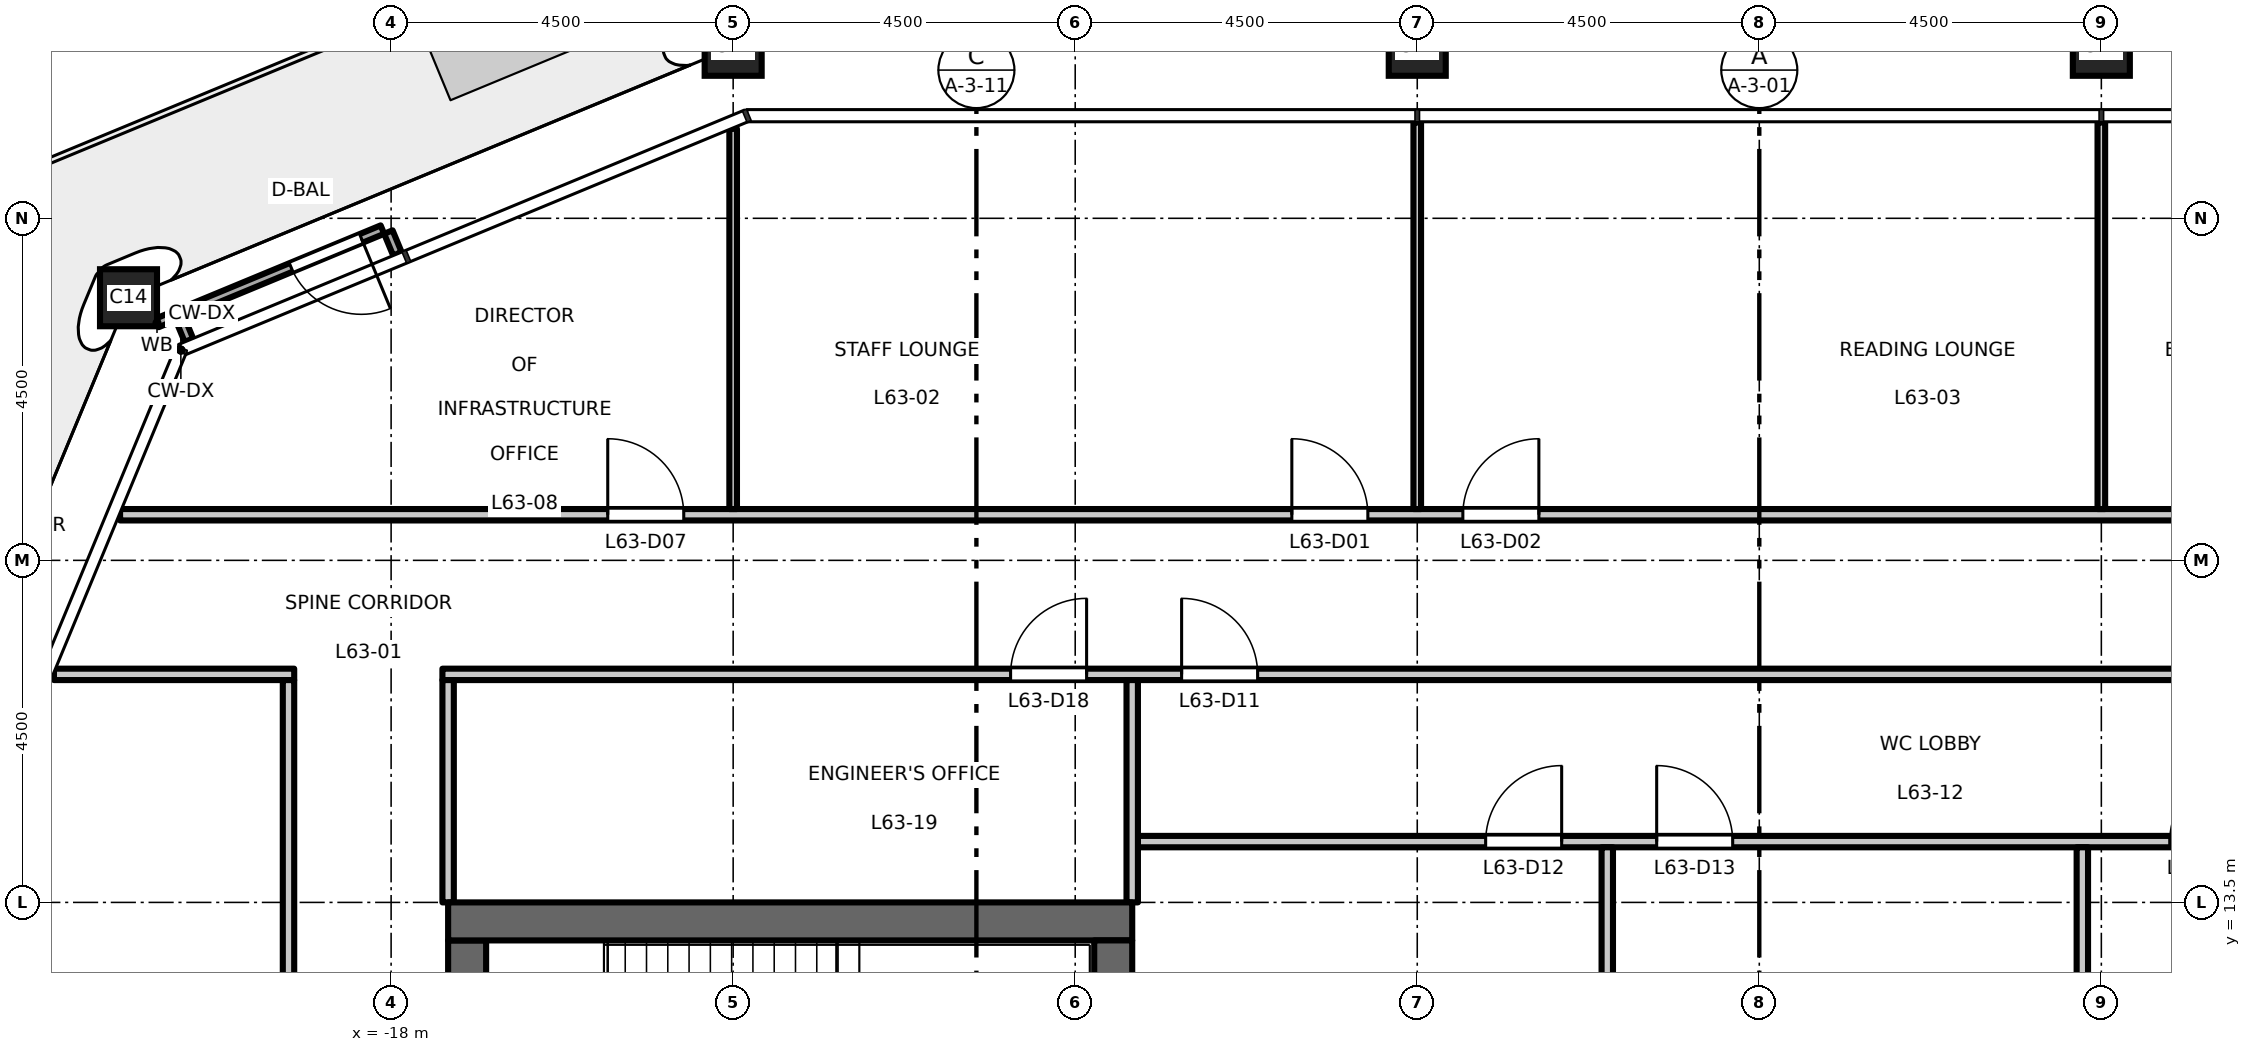
"""IFC4 building model, lengths in metres.
Left out: names, types, materials, properties, quantities, classifications, styles, units other than length and angle.
Written with IfcOpenShell. Run it as: python <this file> out.ifc"""

import sys

from ifc_helpers import new_model, si_unit, direction, frame, frame_2d, origin, origin_2d, place, context, subcontext, project, spatial, rectangle, hollow_rectangle, extrude, element, fill, save


model = new_model("IFC4")
c1 = context("Model", 3, precision=1e-05, world=origin(), true_north=direction((0.0, 1.0)))
c2 = subcontext(c1, "Body", "Model", "MODEL_VIEW")
j1 = project(units=[si_unit("LENGTHUNIT", "METRE"), si_unit("PLANEANGLEUNIT", "RADIAN")], contexts=[c1])
p1 = place(None, origin())
s1 = spatial("IfcSite", under=j1, at=p1, CompositionType="ELEMENT")
p2 = place(p1, origin())
s2 = spatial("IfcBuilding", under=s1, at=p2, CompositionType="ELEMENT")
p3 = place(p2, frame((0.0, 0.0, 294.2)))
s3 = spatial("IfcBuildingStorey", under=s2, at=p3, CompositionType="ELEMENT", Elevation=294.2)
for number, where, z_axis, x_axis in (
    (1, (4.5, 24.75, 0.0), (0.0, 0.0, 1.0), (1.0, 0.0, 0.0)),
    (2, (-4.5, 24.75, 0.0), (0.0, 0.0, 1.0), (1.0, 0.0, 0.0)),
    (3, (-13.5, 24.75, 0.0), (0.0, 0.0, 1.0), (1.0, 0.0, 0.0)),
    (4, (-21.455, 21.455, 0.0), (0.0, 0.0, 1.0), (1.0, 0.0, 0.0)),
):
    element("IfcColumn", number, at=place(p3, frame(where, z_axis=z_axis, x_axis=x_axis)), inside=s3, PredefinedType="COLUMN", context=c2, shape_type="SweptSolid", body=[
        extrude(hollow_rectangle(XDim=0.75, YDim=0.75, WallThickness=0.04, at=origin_2d()), origin(), (0.0, 0.0, 1.0), 4.5),
    ])
p4 = place(p3, frame((-17.0, -13.0, 0.0), z_axis=(0.0, 0.0, 1.0), x_axis=(0.0, 1.0, 0.0)))
e5 = element("IfcWall", 5, at=p4, inside=s3, PredefinedType="SHEAR", context=c2, shape_type="SweptSolid", body=[
    extrude(rectangle(XDim=26.0, YDim=0.5, at=frame_2d((13.0, 0.0))), origin(), (0.0, 0.0, 1.0), 4.35),
])
p5 = place(p4, frame((16.825, 0.0, 0.0)))
e6 = element("IfcOpeningElement", 6, at=p5, cuts=e5, PredefinedType="OPENING", context=c2, shape_type="SweptSolid", body=[
    extrude(rectangle(XDim=1.8, YDim=2.1, at=frame_2d((0.9, 1.05))), frame((0.0, 0.26, 0.0), z_axis=(0.0, -1.0, 0.0), x_axis=(1.0, 0.0, 0.0)), (0.0, 0.0, 1.0), 0.52),
])
p6 = place(p4, frame((7.375, 0.0, 0.0)))
e7 = element("IfcOpeningElement", 7, at=p6, cuts=e5, PredefinedType="OPENING", context=c2, shape_type="SweptSolid", body=[
    extrude(rectangle(XDim=1.8, YDim=2.1, at=frame_2d((0.9, 1.05))), frame((0.0, 0.26, 0.0), z_axis=(0.0, -1.0, 0.0), x_axis=(1.0, 0.0, 0.0)), (0.0, 0.0, 1.0), 0.52),
])
p7 = place(p3, frame((-8.25, 13.25, 0.0), z_axis=(0.0, 0.0, 1.0), x_axis=(-1.0, 0.0, 0.0)))
e8 = element("IfcWall", 8, at=p7, inside=s3, PredefinedType="SHEAR", context=c2, shape_type="SweptSolid", body=[
    extrude(rectangle(XDim=9.0, YDim=0.5, at=frame_2d((4.5, 0.0))), origin(), (0.0, 0.0, 1.0), 4.35),
])
p8 = place(p3, frame((-8.5, -13.0, 0.0), z_axis=(0.0, 0.0, 1.0), x_axis=(0.0, 1.0, 0.0)))
e9 = element("IfcWall", 9, at=p8, inside=s3, PredefinedType="SHEAR", context=c2, shape_type="SweptSolid", body=[
    extrude(rectangle(XDim=26.0, YDim=0.5, at=frame_2d((13.0, 0.0))), origin(), (0.0, 0.0, 1.0), 4.35),
])
p9 = place(p3, frame((-17.917, 22.033, 0.0), z_axis=(0.0, 0.0, 1.0), x_axis=(-0.382769136873, 0.923844027884, 0.0)))
e10 = element("IfcWall", 10, at=p9, inside=s3, PredefinedType="STANDARD", context=c2, shape_type="SweptSolid", body=[
    extrude(rectangle(XDim=0.31, YDim=0.12, at=frame_2d((0.155, 0.0))), origin(), (0.0, 0.0, 1.0), 4.35),
])
p10 = place(p3, frame((-20.66, 20.896, 0.0), z_axis=(0.0, 0.0, 1.0), x_axis=(-0.382490814953, 0.923959293734, 0.0)))
e11 = element("IfcWall", 11, at=p10, inside=s3, PredefinedType="STANDARD", context=c2, shape_type="SweptSolid", body=[
    extrude(rectangle(XDim=0.31, YDim=0.12, at=frame_2d((0.155, 0.0))), origin(), (0.0, 0.0, 1.0), 4.35),
])
p11 = place(p3, frame((-18.115, 22.352, 0.0), z_axis=(0.0, 0.0, 1.0), x_axis=(-0.923880552517, -0.382680969843, 0.0)))
e12 = element("IfcWall", 12, at=p11, inside=s3, PredefinedType="STANDARD", context=c2, shape_type="SweptSolid", body=[
    extrude(rectangle(XDim=3.21, YDim=0.12, at=frame_2d((1.605, 0.0))), origin(), (0.0, 0.0, 1.0), 4.35),
])
p12 = place(p11, frame((0.3, 0.0, 0.0)))
e13 = element("IfcOpeningElement", 13, at=p12, cuts=e12, PredefinedType="OPENING", context=c2, shape_type="SweptSolid", body=[
    extrude(rectangle(XDim=1.0, YDim=2.4, at=frame_2d((0.5, 1.2))), frame((0.0, 0.07, 0.0), z_axis=(0.0, -1.0, 0.0), x_axis=(1.0, 0.0, 0.0)), (0.0, 0.0, 1.0), 0.14),
])
p13 = place(p3, frame((-8.175, 14.3, 0.0), z_axis=(0.0, 0.0, 1.0), x_axis=(1.0, 0.0, 0.0)))
e14 = element("IfcWall", 14, at=p13, inside=s3, PredefinedType="PARTITIONING", context=c2, shape_type="SweptSolid", body=[
    extrude(rectangle(XDim=15.095, YDim=0.15, at=frame_2d((7.547, 0.0))), origin(), (0.0, 0.0, 1.0), 4.35),
])
p14 = place(p13, frame((4.575, 0.0, 0.0)))
e15 = element("IfcOpeningElement", 15, at=p14, cuts=e14, PredefinedType="OPENING", context=c2, shape_type="SweptSolid", body=[
    extrude(rectangle(XDim=1.0, YDim=2.1, at=frame_2d((0.5, 1.05))), frame((0.0, 0.085, 0.0), z_axis=(0.0, -1.0, 0.0), x_axis=(1.0, 0.0, 0.0)), (0.0, 0.0, 1.0), 0.17),
])
p15 = place(p13, frame((6.825, 0.0, 0.0)))
e16 = element("IfcOpeningElement", 16, at=p15, cuts=e14, PredefinedType="OPENING", context=c2, shape_type="SweptSolid", body=[
    extrude(rectangle(XDim=1.0, YDim=2.1, at=frame_2d((0.5, 1.05))), frame((0.0, 0.085, 0.0), z_axis=(0.0, -1.0, 0.0), x_axis=(1.0, 0.0, 0.0)), (0.0, 0.0, 1.0), 0.17),
])
p16 = place(p13, frame((13.575, 0.0, 0.0)))
e17 = element("IfcOpeningElement", 17, at=p16, cuts=e14, PredefinedType="OPENING", context=c2, shape_type="SweptSolid", body=[
    extrude(rectangle(XDim=1.0, YDim=2.1, at=frame_2d((0.5, 1.05))), frame((0.0, 0.085, 0.0), z_axis=(0.0, -1.0, 0.0), x_axis=(1.0, 0.0, 0.0)), (0.0, 0.0, 1.0), 0.17),
])
p17 = place(p3, frame((-22.436, 16.5, 0.0), z_axis=(0.0, 0.0, 1.0), x_axis=(1.0, 0.0, 0.0)))
e18 = element("IfcWall", 18, at=p17, inside=s3, PredefinedType="PARTITIONING", context=c2, shape_type="SweptSolid", body=[
    extrude(rectangle(XDim=3.161, YDim=0.15, at=frame_2d((1.581, 0.0))), origin(), (0.0, 0.0, 1.0), 4.35),
])
p18 = place(p3, frame((-17.325, 16.5, 0.0), z_axis=(0.0, 0.0, 1.0), x_axis=(1.0, 0.0, 0.0)))
e19 = element("IfcWall", 19, at=p18, inside=s3, PredefinedType="PARTITIONING", context=c2, shape_type="SweptSolid", body=[
    extrude(rectangle(XDim=34.65, YDim=0.15, at=frame_2d((17.325, 0.0))), origin(), (0.0, 0.0, 1.0), 4.35),
])
p19 = place(p18, frame((9.725, 0.0, 0.0)))
e20 = element("IfcOpeningElement", 20, at=p19, cuts=e19, PredefinedType="OPENING", context=c2, shape_type="SweptSolid", body=[
    extrude(rectangle(XDim=1.0, YDim=2.1, at=frame_2d((0.5, 1.05))), frame((0.0, 0.085, 0.0), z_axis=(0.0, -1.0, 0.0), x_axis=(1.0, 0.0, 0.0)), (0.0, 0.0, 1.0), 0.17),
])
p20 = place(p18, frame((7.475, 0.0, 0.0)))
e21 = element("IfcOpeningElement", 21, at=p20, cuts=e19, PredefinedType="OPENING", context=c2, shape_type="SweptSolid", body=[
    extrude(rectangle(XDim=1.0, YDim=2.1, at=frame_2d((0.5, 1.05))), frame((0.0, 0.085, 0.0), z_axis=(0.0, -1.0, 0.0), x_axis=(1.0, 0.0, 0.0)), (0.0, 0.0, 1.0), 0.17),
])
p21 = place(p18, frame((26.225, 0.0, 0.0)))
e22 = element("IfcOpeningElement", 22, at=p21, cuts=e19, PredefinedType="OPENING", context=c2, shape_type="SweptSolid", body=[
    extrude(rectangle(XDim=1.0, YDim=2.1, at=frame_2d((0.5, 1.05))), frame((0.0, 0.085, 0.0), z_axis=(0.0, -1.0, 0.0), x_axis=(1.0, 0.0, 0.0)), (0.0, 0.0, 1.0), 0.17),
])
p22 = place(p3, frame((-21.566, 18.6, 0.0), z_axis=(0.0, 0.0, 1.0), x_axis=(1.0, 0.0, 0.0)))
e23 = element("IfcWall", 23, at=p22, inside=s3, PredefinedType="PARTITIONING", context=c2, shape_type="SweptSolid", body=[
    extrude(rectangle(XDim=43.132, YDim=0.15, at=frame_2d((21.566, 0.0))), origin(), (0.0, 0.0, 1.0), 4.35),
])
p23 = place(p22, frame((15.416, 0.0, 0.0)))
e24 = element("IfcOpeningElement", 24, at=p23, cuts=e23, PredefinedType="OPENING", context=c2, shape_type="SweptSolid", body=[
    extrude(rectangle(XDim=1.0, YDim=2.1, at=frame_2d((0.5, 1.05))), frame((0.0, 0.085, 0.0), z_axis=(0.0, -1.0, 0.0), x_axis=(1.0, 0.0, 0.0)), (0.0, 0.0, 1.0), 0.17),
])
p24 = place(p22, frame((17.666, 0.0, 0.0)))
e25 = element("IfcOpeningElement", 25, at=p24, cuts=e23, PredefinedType="OPENING", context=c2, shape_type="SweptSolid", body=[
    extrude(rectangle(XDim=1.0, YDim=2.1, at=frame_2d((0.5, 1.05))), frame((0.0, 0.085, 0.0), z_axis=(0.0, -1.0, 0.0), x_axis=(1.0, 0.0, 0.0)), (0.0, 0.0, 1.0), 0.17),
])
p25 = place(p22, frame((33.416, 0.0, 0.0)))
e26 = element("IfcOpeningElement", 26, at=p25, cuts=e23, PredefinedType="OPENING", context=c2, shape_type="SweptSolid", body=[
    extrude(rectangle(XDim=1.0, YDim=2.1, at=frame_2d((0.5, 1.05))), frame((0.0, 0.085, 0.0), z_axis=(0.0, -1.0, 0.0), x_axis=(1.0, 0.0, 0.0)), (0.0, 0.0, 1.0), 0.17),
])
p26 = place(p22, frame((6.416, 0.0, 0.0)))
e27 = element("IfcOpeningElement", 27, at=p26, cuts=e23, PredefinedType="OPENING", context=c2, shape_type="SweptSolid", body=[
    extrude(rectangle(XDim=1.0, YDim=2.1, at=frame_2d((0.5, 1.05))), frame((0.0, 0.085, 0.0), z_axis=(0.0, -1.0, 0.0), x_axis=(1.0, 0.0, 0.0)), (0.0, 0.0, 1.0), 0.17),
])
p27 = place(p22, frame((35.732, 0.0, 0.0)))
e28 = element("IfcOpeningElement", 28, at=p27, cuts=e23, PredefinedType="OPENING", context=c2, shape_type="SweptSolid", body=[
    extrude(rectangle(XDim=1.0, YDim=2.1, at=frame_2d((0.5, 1.05))), frame((0.0, 0.085, 0.0), z_axis=(0.0, -1.0, 0.0), x_axis=(1.0, 0.0, 0.0)), (0.0, 0.0, 1.0), 0.17),
])
p28 = place(p3, frame((-19.35, -16.425, 0.0), z_axis=(0.0, 0.0, 1.0), x_axis=(0.0, 1.0, 0.0)))
e29 = element("IfcWall", 29, at=p28, inside=s3, PredefinedType="PARTITIONING", context=c2, shape_type="SweptSolid", body=[
    extrude(rectangle(XDim=32.85, YDim=0.15, at=frame_2d((16.425, 0.0))), origin(), (0.0, 0.0, 1.0), 4.35),
])
p29 = place(p28, frame((0.525, 0.0, 0.0)))
e30 = element("IfcOpeningElement", 30, at=p29, cuts=e29, PredefinedType="OPENING", context=c2, shape_type="SweptSolid", body=[
    extrude(rectangle(XDim=1.0, YDim=2.1, at=frame_2d((0.5, 1.05))), frame((0.0, 0.085, 0.0), z_axis=(0.0, -1.0, 0.0), x_axis=(1.0, 0.0, 0.0)), (0.0, 0.0, 1.0), 0.17),
])
p30 = place(p3, frame((-17.25, 13.5, 0.0), z_axis=(0.0, 0.0, 1.0), x_axis=(0.0, 1.0, 0.0)))
e31 = element("IfcWall", 31, at=p30, inside=s3, PredefinedType="PARTITIONING", context=c2, shape_type="SweptSolid", body=[
    extrude(rectangle(XDim=2.925, YDim=0.15, at=frame_2d((1.462, 0.0))), origin(), (0.0, 0.0, 1.0), 4.35),
])
p31 = place(p3, frame((-13.5, 18.675, 0.0), z_axis=(0.0, 0.0, 1.0), x_axis=(0.0, 1.0, 0.0)))
e32 = element("IfcWall", 32, at=p31, inside=s3, PredefinedType="PARTITIONING", context=c2, shape_type="SweptSolid", body=[
    extrude(rectangle(XDim=5.003, YDim=0.1, at=frame_2d((2.501, 0.0))), origin(), (0.0, 0.0, 1.0), 3.75),
])
p32 = place(p3, frame((-8.25, 13.5, 0.0), z_axis=(0.0, 0.0, 1.0), x_axis=(0.0, 1.0, 0.0)))
e33 = element("IfcWall", 33, at=p32, inside=s3, PredefinedType="PARTITIONING", context=c2, shape_type="SweptSolid", body=[
    extrude(rectangle(XDim=2.925, YDim=0.15, at=frame_2d((1.462, 0.0))), origin(), (0.0, 0.0, 1.0), 4.35),
])
p33 = place(p3, frame((-4.5, 18.675, 0.0), z_axis=(0.0, 0.0, 1.0), x_axis=(0.0, 1.0, 0.0)))
e34 = element("IfcWall", 34, at=p33, inside=s3, PredefinedType="PARTITIONING", context=c2, shape_type="SweptSolid", body=[
    extrude(rectangle(XDim=5.085, YDim=0.1, at=frame_2d((2.542, 0.0))), origin(), (0.0, 0.0, 1.0), 3.65),
])
for number, where, z_axis, x_axis in (
    (35, (-2.0, 8.37, 0.0), (0.0, 0.0, 1.0), (0.0, 1.0, 0.0)),
    (36, (4.25, 8.37, 0.0), (0.0, 0.0, 1.0), (0.0, 1.0, 0.0)),
):
    element("IfcWall", number, at=place(p3, frame(where, z_axis=z_axis, x_axis=x_axis)), inside=s3, PredefinedType="PARTITIONING", context=c2, shape_type="SweptSolid", body=[
        extrude(rectangle(XDim=5.855, YDim=0.15, at=frame_2d((2.927, 0.0))), origin(), (0.0, 0.0, 1.0), 4.35),
    ])
p34 = place(p3, frame((4.5, 18.675, 0.0), z_axis=(0.0, 0.0, 1.0), x_axis=(0.0, 1.0, 0.0)))
e37 = element("IfcWall", 37, at=p34, inside=s3, PredefinedType="PARTITIONING", context=c2, shape_type="SweptSolid", body=[
    extrude(rectangle(XDim=5.085, YDim=0.1, at=frame_2d((2.542, 0.0))), origin(), (0.0, 0.0, 1.0), 3.65),
])
p35 = place(p12, origin())
e38 = element("IfcDoor", 38, at=p35, inside=s3, OperationType="SINGLE_SWING_LEFT", PredefinedType="DOOR", context=c2, shape_type="SweptSolid", body=[
    extrude(rectangle(XDim=1.0, YDim=2.4, at=frame_2d((0.5, 1.2))), frame((0.0, 0.025, 0.0), z_axis=(0.0, -1.0, 0.0), x_axis=(1.0, 0.0, 0.0)), (0.0, 0.0, 1.0), 0.05),
])
fill(e13, e38)
p36 = place(p23, origin())
e39 = element("IfcDoor", 39, at=p36, inside=s3, OperationType="SINGLE_SWING_LEFT", PredefinedType="DOOR", context=c2, shape_type="SweptSolid", body=[
    extrude(rectangle(XDim=1.0, YDim=2.1, at=frame_2d((0.5, 1.05))), frame((0.0, 0.025, 0.0), z_axis=(0.0, -1.0, 0.0), x_axis=(1.0, 0.0, 0.0)), (0.0, 0.0, 1.0), 0.05),
])
fill(e24, e39)
p37 = place(p24, origin())
e40 = element("IfcDoor", 40, at=p37, inside=s3, OperationType="SINGLE_SWING_RIGHT", PredefinedType="DOOR", context=c2, shape_type="SweptSolid", body=[
    extrude(rectangle(XDim=1.0, YDim=2.1, at=frame_2d((0.5, 1.05))), frame((0.0, 0.025, 0.0), z_axis=(0.0, -1.0, 0.0), x_axis=(1.0, 0.0, 0.0)), (0.0, 0.0, 1.0), 0.05),
])
fill(e25, e40)
p38 = place(p26, origin())
e41 = element("IfcDoor", 41, at=p38, inside=s3, OperationType="SINGLE_SWING_LEFT", PredefinedType="DOOR", context=c2, shape_type="SweptSolid", body=[
    extrude(rectangle(XDim=1.0, YDim=2.1, at=frame_2d((0.5, 1.05))), frame((0.0, 0.025, 0.0), z_axis=(0.0, -1.0, 0.0), x_axis=(1.0, 0.0, 0.0)), (0.0, 0.0, 1.0), 0.05),
])
fill(e27, e41)
p39 = place(p19, origin())
e42 = element("IfcDoor", 42, at=p39, inside=s3, OperationType="SINGLE_SWING_LEFT", PredefinedType="DOOR", context=c2, shape_type="SweptSolid", body=[
    extrude(rectangle(XDim=1.0, YDim=2.1, at=frame_2d((0.5, 1.05))), frame((0.0, 0.025, 0.0), z_axis=(0.0, -1.0, 0.0), x_axis=(1.0, 0.0, 0.0)), (0.0, 0.0, 1.0), 0.05),
])
fill(e20, e42)
p40 = place(p14, origin())
e43 = element("IfcDoor", 43, at=p40, inside=s3, OperationType="SINGLE_SWING_RIGHT", PredefinedType="DOOR", context=c2, shape_type="SweptSolid", body=[
    extrude(rectangle(XDim=1.0, YDim=2.1, at=frame_2d((0.5, 1.05))), frame((0.0, 0.025, 0.0), z_axis=(0.0, -1.0, 0.0), x_axis=(1.0, 0.0, 0.0)), (0.0, 0.0, 1.0), 0.05),
])
fill(e15, e43)
p41 = place(p15, origin())
e44 = element("IfcDoor", 44, at=p41, inside=s3, OperationType="SINGLE_SWING_LEFT", PredefinedType="DOOR", context=c2, shape_type="SweptSolid", body=[
    extrude(rectangle(XDim=1.0, YDim=2.1, at=frame_2d((0.5, 1.05))), frame((0.0, 0.025, 0.0), z_axis=(0.0, -1.0, 0.0), x_axis=(1.0, 0.0, 0.0)), (0.0, 0.0, 1.0), 0.05),
])
fill(e16, e44)
p42 = place(p16, origin())
e45 = element("IfcDoor", 45, at=p42, inside=s3, OperationType="SINGLE_SWING_RIGHT", PredefinedType="DOOR", context=c2, shape_type="SweptSolid", body=[
    extrude(rectangle(XDim=1.0, YDim=2.1, at=frame_2d((0.5, 1.05))), frame((0.0, 0.025, 0.0), z_axis=(0.0, -1.0, 0.0), x_axis=(1.0, 0.0, 0.0)), (0.0, 0.0, 1.0), 0.05),
])
fill(e17, e45)
p43 = place(p20, origin())
e46 = element("IfcDoor", 46, at=p43, inside=s3, OperationType="SINGLE_SWING_RIGHT", PredefinedType="DOOR", context=c2, shape_type="SweptSolid", body=[
    extrude(rectangle(XDim=1.0, YDim=2.1, at=frame_2d((0.5, 1.05))), frame((0.0, 0.025, 0.0), z_axis=(0.0, -1.0, 0.0), x_axis=(1.0, 0.0, 0.0)), (0.0, 0.0, 1.0), 0.05),
])
fill(e21, e46)
save(model, sys.argv[1])
